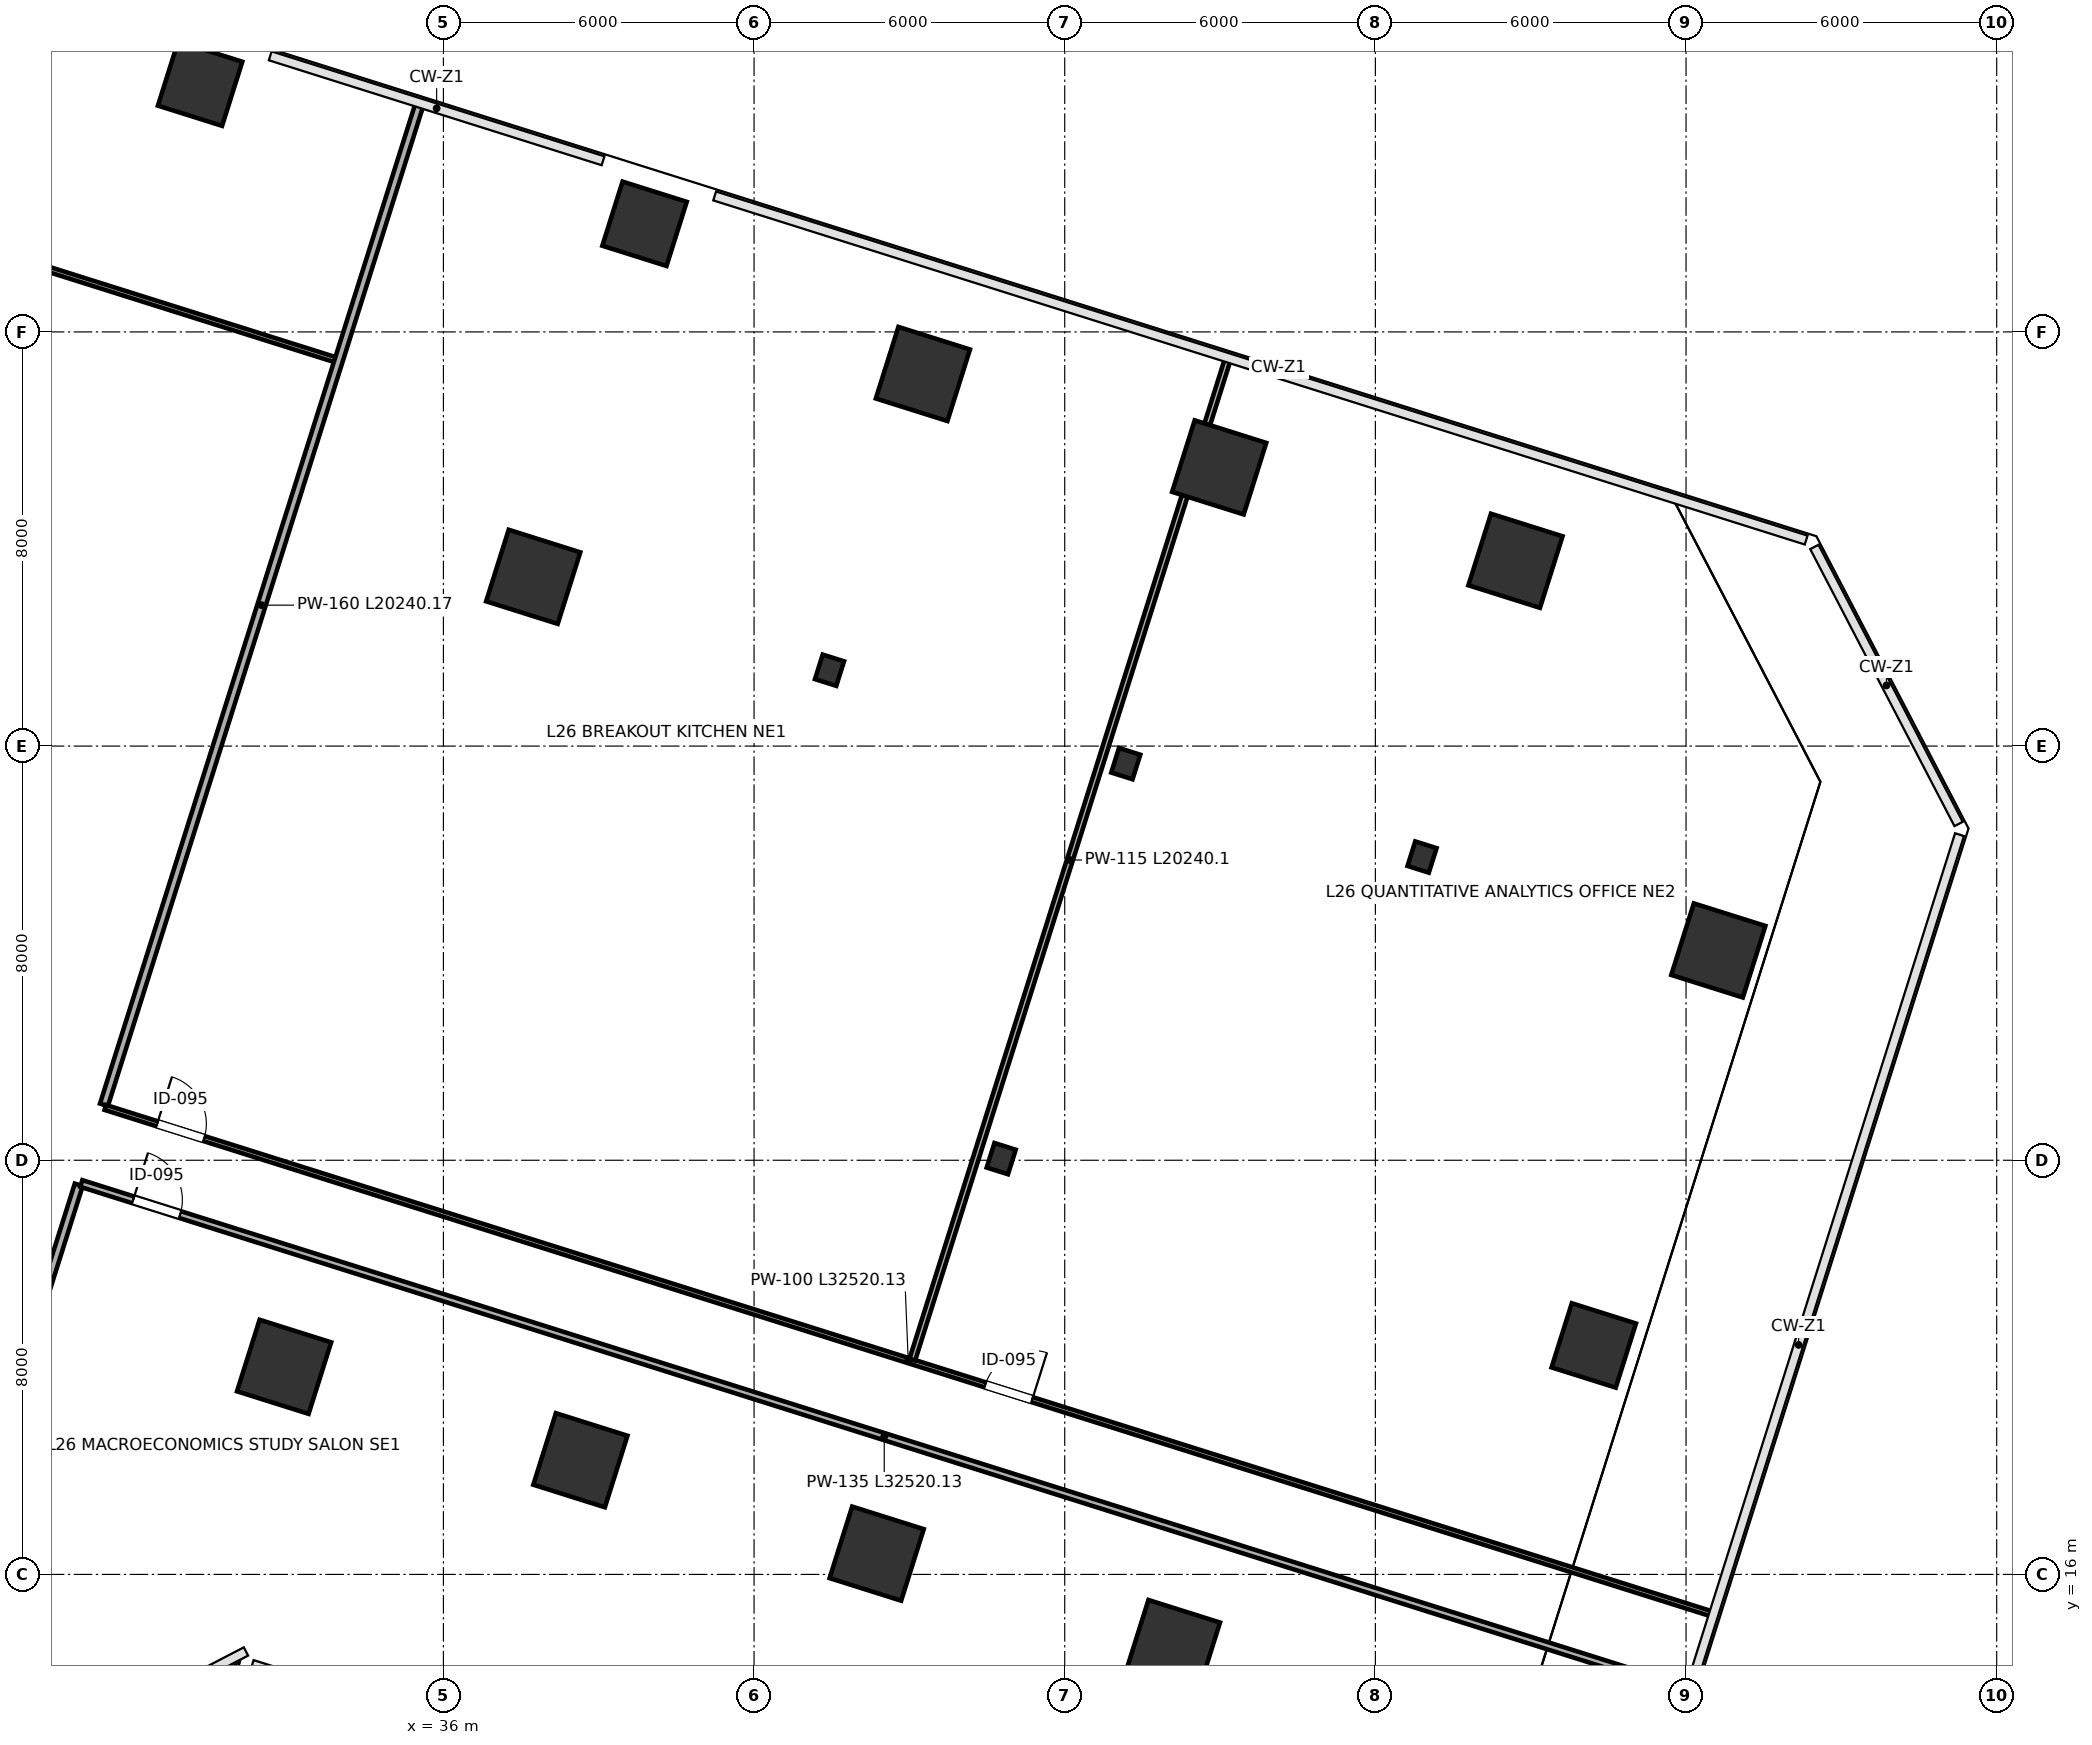
"""IFC4 building model, lengths in metres.
Left out: names, types, materials, properties, quantities, classifications, styles, units other than length and angle.
Written with IfcOpenShell. Run it as: python <this file> out.ifc"""

import sys

from ifc_helpers import new_model, si_unit, direction, frame, frame_2d, origin, origin_2d, place, context, subcontext, project, spatial, rectangle, i_section, extrude, source, transform, mapped, element, fill, save


model = new_model("IFC4")
c1 = context("Model", 3, precision=1e-05, world=origin(), true_north=direction((0.0, 1.0)))
c2 = subcontext(c1, "Body", "Model", "MODEL_VIEW")
j1 = project(units=[si_unit("LENGTHUNIT", "METRE"), si_unit("PLANEANGLEUNIT", "RADIAN")], contexts=[c1])
p1 = place(None, origin())
s1 = spatial("IfcSite", under=j1, at=p1, CompositionType="ELEMENT")
p2 = place(p1, origin())
s2 = spatial("IfcBuilding", under=s1, at=p2, CompositionType="ELEMENT")
p3 = place(p2, frame((0.0, 0.0, 116.8)))
s3 = spatial("IfcBuildingStorey", under=s2, at=p3, CompositionType="ELEMENT", Elevation=116.8)
m1 = source(origin(), c2, "Body", "SweptSolid", [
    extrude(rectangle(XDim=1.3, YDim=1.3, at=origin_2d()), origin(), (0.0, 0.0, 1.0), 5.398),
])
p4 = place(p3, frame((31.301, 44.795, 0.001), z_axis=(0.0, 0.0, 1.0), x_axis=(-0.953716950748, 0.300705799504, 0.0)))
e1 = element("IfcColumn", 1, at=p4, inside=s3, PredefinedType="COLUMN", context=c2, shape_type="MappedRepresentation", body=[
    mapped(m1, transform((0.0, 0.0, 0.0), scale=1.0)),
])
m2 = source(origin(), c2, "Body", "SweptSolid", [
    extrude(rectangle(XDim=1.45, YDim=1.45, at=origin_2d()), origin(), (0.0, 0.0, 1.0), 5.398),
])
for number, where, z_axis, x_axis in (
    (2, (32.923, 20.01, 0.001), (0.0, 0.0, 1.0), (-0.954, 0.301, 0.0)),
    (3, (37.735, 35.27, 0.001), (0.0, 0.0, 1.0), (-0.954, 0.301, 0.0)),
):
    element("IfcColumn", number, at=place(p3, frame(where, z_axis=z_axis, x_axis=x_axis)), inside=s3, PredefinedType="COLUMN", context=c2, shape_type="MappedRepresentation", body=[
        mapped(m2, transform((0.0, 0.0, 0.0), scale=1.0)),
    ])
p5 = place(p3, frame((39.885, 42.089, 0.001), z_axis=(0.0, 0.0, 1.0), x_axis=(-0.953716950748, 0.300705799504, 0.0)))
e4 = element("IfcColumn", 4, at=p5, inside=s3, PredefinedType="COLUMN", context=c2, shape_type="MappedRepresentation", body=[
    mapped(m1, transform((0.0, 0.0, 0.0), scale=1.0)),
])
p6 = place(p3, frame((38.646, 18.206, 0.001), z_axis=(0.0, 0.0, 1.0), x_axis=(-0.953716950748, 0.300705799504, 0.0)))
e5 = element("IfcColumn", 5, at=p6, inside=s3, PredefinedType="COLUMN", context=c2, shape_type="MappedRepresentation", body=[
    mapped(m2, transform((0.0, 0.0, 0.0), scale=1.0)),
])
m3 = source(origin(), c2, "Body", "SweptSolid", [
    extrude(i_section(OverallWidth=0.432, OverallDepth=0.498, WebThickness=0.056, FlangeThickness=0.089, FilletRadius=0.015, at=origin_2d()), origin(), (0.0, 0.0, 1.0), 5.398),
])
p7 = place(p3, frame((43.457, 33.465, 0.001), z_axis=(0.0, 0.0, 1.0), x_axis=(-0.953716950748, 0.300705799504, 0.0)))
e6 = element("IfcColumn", 6, at=p7, inside=s3, PredefinedType="COLUMN", context=c2, shape_type="MappedRepresentation", body=[
    mapped(m3, transform((0.0, 0.0, 0.0), scale=1.0)),
])
for number, where, z_axis, x_axis in (
    (7, (45.261, 39.188, 0.001), (0.0, 0.0, 1.0), (-0.954, 0.301, 0.0)),
    (8, (44.368, 16.402, 0.001), (0.0, 0.0, 1.0), (-0.954, 0.301, 0.0)),
):
    element("IfcColumn", number, at=place(p3, frame(where, z_axis=z_axis, x_axis=x_axis)), inside=s3, PredefinedType="COLUMN", context=c2, shape_type="MappedRepresentation", body=[
        mapped(m2, transform((0.0, 0.0, 0.0), scale=1.0)),
    ])
for number, where, z_axis, x_axis in (
    (9, (46.773, 24.031, 0.001), (0.0, 0.0, 1.0), (-0.954, 0.301, 0.0)),
    (10, (49.179, 31.661, 0.001), (0.0, 0.0, 1.0), (-0.954, 0.301, 0.0)),
):
    element("IfcColumn", number, at=place(p3, frame(where, z_axis=z_axis, x_axis=x_axis)), inside=s3, PredefinedType="COLUMN", context=c2, shape_type="MappedRepresentation", body=[
        mapped(m3, transform((0.0, 0.0, 0.0), scale=1.0)),
    ])
for number, where, z_axis, x_axis in (
    (11, (50.983, 37.383, 0.001), (0.0, 0.0, 1.0), (-0.954, 0.301, 0.0)),
    (12, (50.09, 14.597, 0.001), (0.0, 0.0, 1.0), (-0.954, 0.301, 0.0)),
):
    element("IfcColumn", number, at=place(p3, frame(where, z_axis=z_axis, x_axis=x_axis)), inside=s3, PredefinedType="COLUMN", context=c2, shape_type="MappedRepresentation", body=[
        mapped(m2, transform((0.0, 0.0, 0.0), scale=1.0)),
    ])
p8 = place(p3, frame((54.901, 29.857, 0.001), z_axis=(0.0, 0.0, 1.0), x_axis=(-0.953716950748, 0.300705799504, 0.0)))
e13 = element("IfcColumn", 13, at=p8, inside=s3, PredefinedType="COLUMN", context=c2, shape_type="MappedRepresentation", body=[
    mapped(m3, transform((0.0, 0.0, 0.0), scale=1.0)),
])
p9 = place(p3, frame((56.706, 35.579, 0.001), z_axis=(0.0, 0.0, 1.0), x_axis=(-0.953716950748, 0.300705799504, 0.0)))
e14 = element("IfcColumn", 14, at=p9, inside=s3, PredefinedType="COLUMN", context=c2, shape_type="MappedRepresentation", body=[
    mapped(m2, transform((0.0, 0.0, 0.0), scale=1.0)),
])
p10 = place(p3, frame((58.218, 20.423, 0.001), z_axis=(0.0, 0.0, 1.0), x_axis=(-0.953716950748, 0.300705799504, 0.0)))
e15 = element("IfcColumn", 15, at=p10, inside=s3, PredefinedType="COLUMN", context=c2, shape_type="MappedRepresentation", body=[
    mapped(m1, transform((0.0, 0.0, 0.0), scale=1.0)),
])
m4 = source(origin(), c2, "Body", "SweptSolid", [
    extrude(rectangle(XDim=1.45, YDim=1.45, at=origin_2d()), origin(), (0.0, 0.0, 1.0), 5.398),
])
p11 = place(p3, frame((60.624, 28.052, 0.001), z_axis=(0.0, 0.0, 1.0), x_axis=(-0.953716950748, 0.300705799504, 0.0)))
e16 = element("IfcColumn", 16, at=p11, inside=s3, PredefinedType="COLUMN", context=c2, shape_type="MappedRepresentation", body=[
    mapped(m4, transform((0.0, 0.0, 0.0), scale=1.0)),
])
p12 = place(p3, frame((8.053, 47.616, 0.0), z_axis=(0.0, 0.0, 1.0), x_axis=(0.953717706363, -0.300703402989, 0.0)))
e17 = element("IfcWall", 17, at=p12, inside=s3, PredefinedType="PARTITIONING", context=c2, shape_type="SweptSolid", body=[
    extrude(rectangle(XDim=27.14, YDim=0.1, at=frame_2d((13.57, 0.0))), origin(), (0.0, 0.0, 1.0), 5.12),
])
p13 = place(p12, frame((0.91, 0.0, 0.0)))
e18 = element("IfcOpeningElement", 18, at=p13, cuts=e17, PredefinedType="OPENING", context=c2, shape_type="SweptSolid", body=[
    extrude(rectangle(XDim=0.95, YDim=2.15, at=frame_2d((0.475, 1.075))), frame((0.0, 0.06, 0.0), z_axis=(0.0, -1.0, 0.0), x_axis=(1.0, 0.0, 0.0)), (0.0, 0.0, 1.0), 0.12),
])
p14 = place(p3, frame((29.444, 25.07, 0.0), z_axis=(0.0, 0.0, 1.0), x_axis=(0.300708769024, 0.953716014457, 0.0)))
e19 = element("IfcWall", 19, at=p14, inside=s3, PredefinedType="PARTITIONING", context=c2, shape_type="SweptSolid", body=[
    extrude(rectangle(XDim=20.24, YDim=0.16, at=frame_2d((10.12, 0.0))), origin(), (0.0, 0.0, 1.0), 4.255),
])
p15 = place(p3, frame((25.294, 11.909, 0.0), z_axis=(0.0, 0.0, 1.0), x_axis=(0.300707324156, 0.953716470026, 0.0)))
e20 = element("IfcWall", 20, at=p15, inside=s3, PredefinedType="PARTITIONING", context=c2, shape_type="SweptSolid", body=[
    extrude(rectangle(XDim=12.18, YDim=0.16, at=frame_2d((6.09, 0.0))), origin(), (0.0, 0.0, 1.0), 5.12),
])
p16 = place(p3, frame((29.47, 25.02, 0.0), z_axis=(0.0, 0.0, 1.0), x_axis=(0.953716794744, -0.300706294286, 0.0)))
e21 = element("IfcWall", 21, at=p16, inside=s3, PredefinedType="PARTITIONING", context=c2, shape_type="SweptSolid", body=[
    extrude(rectangle(XDim=32.52, YDim=0.1, at=frame_2d((16.26, 0.0))), origin(), (0.0, 0.0, 1.0), 4.255),
])
p17 = place(p16, frame((1.05, 0.0, 0.0)))
e22 = element("IfcOpeningElement", 22, at=p17, cuts=e21, PredefinedType="OPENING", context=c2, shape_type="SweptSolid", body=[
    extrude(rectangle(XDim=0.95, YDim=2.15, at=frame_2d((0.475, 1.075))), frame((0.0, 0.06, 0.0), z_axis=(0.0, -1.0, 0.0), x_axis=(1.0, 0.0, 0.0)), (0.0, 0.0, 1.0), 0.12),
])
p18 = place(p16, frame((17.82, 0.0, 0.0)))
e23 = element("IfcOpeningElement", 23, at=p18, cuts=e21, PredefinedType="OPENING", context=c2, shape_type="SweptSolid", body=[
    extrude(rectangle(XDim=0.95, YDim=2.15, at=frame_2d((0.475, 1.075))), frame((0.0, 0.06, 0.0), z_axis=(0.0, -1.0, 0.0), x_axis=(1.0, 0.0, 0.0)), (0.0, 0.0, 1.0), 0.12),
])
p19 = place(p3, frame((29.007, 23.552, 0.0), z_axis=(0.0, 0.0, 1.0), x_axis=(0.953718947743, -0.300699465773, 0.0)))
e24 = element("IfcWall", 24, at=p19, inside=s3, PredefinedType="PARTITIONING", context=c2, shape_type="SweptSolid", body=[
    extrude(rectangle(XDim=32.52, YDim=0.135, at=frame_2d((16.26, 0.0))), origin(), (0.0, 0.0, 1.0), 4.255),
])
p20 = place(p19, frame((1.05, 0.0, 0.0)))
e25 = element("IfcOpeningElement", 25, at=p20, cuts=e24, PredefinedType="OPENING", context=c2, shape_type="SweptSolid", body=[
    extrude(rectangle(XDim=0.95, YDim=2.15, at=frame_2d((0.475, 1.075))), frame((0.0, 0.078, 0.0), z_axis=(0.0, -1.0, 0.0), x_axis=(1.0, 0.0, 0.0)), (0.0, 0.0, 1.0), 0.155),
])
p21 = place(p3, frame((45.056, 20.148, 0.0), z_axis=(0.0, 0.0, 1.0), x_axis=(0.300712228368, 0.953714923712, 0.0)))
e26 = element("IfcWall", 26, at=p21, inside=s3, PredefinedType="PARTITIONING", context=c2, shape_type="SweptSolid", body=[
    extrude(rectangle(XDim=20.24, YDim=0.115, at=frame_2d((10.12, 0.0))), origin(), (0.0, 0.0, 1.0), 4.483),
])
m5 = source(origin(), c2, "Body", "SweptSolid", [
    extrude(rectangle(XDim=0.95, YDim=2.15, at=frame_2d((0.475, 1.075))), frame((0.0, 0.025, 0.0), z_axis=(0.0, -1.0, 0.0), x_axis=(1.0, 0.0, 0.0)), (0.0, 0.0, 1.0), 0.05),
])
p22 = place(p17, origin())
e27 = element("IfcDoor", 27, at=p22, inside=s3, OperationType="SINGLE_SWING_LEFT", PredefinedType="DOOR", context=c2, shape_type="MappedRepresentation", body=[
    mapped(m5, transform((0.0, 0.0, 0.0), scale=1.0)),
])
fill(e22, e27)
p23 = place(p18, origin())
e28 = element("IfcDoor", 28, at=p23, inside=s3, OperationType="SINGLE_SWING_RIGHT", PredefinedType="DOOR", context=c2, shape_type="MappedRepresentation", body=[
    mapped(m5, transform((0.0, 0.0, 0.0), scale=1.0)),
])
fill(e23, e28)
p24 = place(p20, origin())
e29 = element("IfcDoor", 29, at=p24, inside=s3, OperationType="SINGLE_SWING_LEFT", PredefinedType="DOOR", context=c2, shape_type="MappedRepresentation", body=[
    mapped(m5, transform((0.0, 0.0, 0.0), scale=1.0)),
])
fill(e25, e29)
save(model, sys.argv[1])
